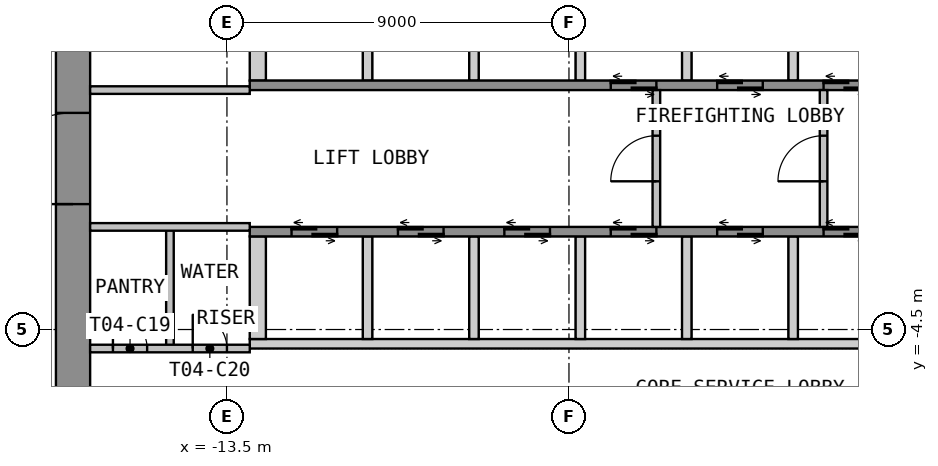
"""IFC4 building model, lengths in metres.
Left out: names, types, materials, properties, quantities, classifications, styles, units other than length and angle.
Written with IfcOpenShell. Run it as: python <this file> out.ifc"""

import sys

from ifc_helpers import new_model, si_unit, direction, frame, frame_2d, origin, place, context, subcontext, project, spatial, polyline, rectangle, outline, extrude, element, fill, save


model = new_model("IFC4")
c1 = context("Model", 3, precision=1e-05, world=origin(), true_north=direction((0.0, 1.0)))
c2 = subcontext(c1, "Body", "Model", "MODEL_VIEW")
j1 = project(units=[si_unit("LENGTHUNIT", "METRE"), si_unit("PLANEANGLEUNIT", "RADIAN")], contexts=[c1])
p1 = place(None, origin())
s1 = spatial("IfcSite", under=j1, at=p1, CompositionType="ELEMENT")
p2 = place(p1, origin())
s2 = spatial("IfcBuilding", under=s1, at=p2, CompositionType="ELEMENT")
p3 = place(p2, frame((0.0, 0.0, 65.1)))
s3 = spatial("IfcBuildingStorey", under=s2, at=p3, CompositionType="ELEMENT", Elevation=65.1)
p4 = place(p3, frame((-17.55, -12.6, 0.0), z_axis=(0.0, 0.0, 1.0), x_axis=(0.0, 1.0, 0.0)))
e1 = element("IfcWall", 1, at=p4, inside=s3, PredefinedType="SHEAR", context=c2, shape_type="SweptSolid", body=[
    extrude(rectangle(XDim=25.2, YDim=0.9, at=frame_2d((12.6, 0.0))), origin(), (0.0, 0.0, 1.0), 3.525),
])
p5 = place(p4, frame((11.4, 0.0, 0.0)))
e2 = element("IfcOpeningElement", 2, at=p5, cuts=e1, PredefinedType="OPENING", context=c2, shape_type="SweptSolid", body=[
    extrude(rectangle(XDim=2.4, YDim=2.1, at=frame_2d((1.2, 1.05))), frame((0.0, 0.46, 0.0), z_axis=(0.0, -1.0, 0.0), x_axis=(1.0, 0.0, 0.0)), (0.0, 0.0, 1.0), 0.92),
])
p6 = place(p3, origin())
e3 = element("IfcWall", 3, at=p6, inside=s3, PredefinedType="SHEAR", context=c2, shape_type="SweptSolid", body=[
    extrude(outline(polyline([(-12.9, 2.05), (-12.475, 2.05), (-12.475, 4.75), (-12.9, 4.75), (-12.9, 2.05)])), origin(), (0.0, 0.0, 1.0), 3.525),
])
p7 = place(p3, origin())
e4 = element("IfcWall", 4, at=p7, inside=s3, PredefinedType="SHEAR", context=c2, shape_type="SweptSolid", body=[
    extrude(outline(polyline([(-9.925, 2.05), (-9.675, 2.05), (-9.675, 4.75), (-9.925, 4.75), (-9.925, 2.05)])), origin(), (0.0, 0.0, 1.0), 3.525),
])
p8 = place(p3, origin())
e5 = element("IfcWall", 5, at=p8, inside=s3, PredefinedType="SHEAR", context=c2, shape_type="SweptSolid", body=[
    extrude(outline(polyline([(-7.125, 2.05), (-6.875, 2.05), (-6.875, 4.75), (-7.125, 4.75), (-7.125, 2.05)])), origin(), (0.0, 0.0, 1.0), 3.525),
])
p9 = place(p3, origin())
e6 = element("IfcWall", 6, at=p9, inside=s3, PredefinedType="SHEAR", context=c2, shape_type="SweptSolid", body=[
    extrude(outline(polyline([(-4.325, 2.05), (-4.075, 2.05), (-4.075, 4.75), (-4.325, 4.75), (-4.325, 2.05)])), origin(), (0.0, 0.0, 1.0), 3.525),
])
p10 = place(p3, origin())
e7 = element("IfcWall", 7, at=p10, inside=s3, PredefinedType="SHEAR", context=c2, shape_type="SweptSolid", body=[
    extrude(outline(polyline([(-1.525, 2.05), (-1.275, 2.05), (-1.275, 4.75), (-1.525, 4.75), (-1.525, 2.05)])), origin(), (0.0, 0.0, 1.0), 3.525),
])
p11 = place(p3, origin())
e8 = element("IfcWall", 8, at=p11, inside=s3, PredefinedType="SHEAR", context=c2, shape_type="SweptSolid", body=[
    extrude(outline(polyline([(1.275, 2.05), (1.525, 2.05), (1.525, 4.75), (1.275, 4.75), (1.275, 2.05)])), origin(), (0.0, 0.0, 1.0), 3.525),
])
p12 = place(p3, frame((-12.9, 1.925, 0.0), z_axis=(0.0, 0.0, 1.0), x_axis=(1.0, 0.0, 0.0)))
e9 = element("IfcWall", 9, at=p12, inside=s3, PredefinedType="SHEAR", context=c2, shape_type="SweptSolid", body=[
    extrude(rectangle(XDim=25.8, YDim=0.25, at=frame_2d((12.9, 0.0))), origin(), (0.0, 0.0, 1.0), 3.525),
])
p13 = place(p12, frame((9.5, 0.0, 0.0)))
e10 = element("IfcOpeningElement", 10, at=p13, cuts=e9, PredefinedType="OPENING", context=c2, shape_type="SweptSolid", body=[
    extrude(rectangle(XDim=1.2, YDim=2.1, at=frame_2d((0.6, 1.05))), frame((0.0, 0.135, 0.0), z_axis=(0.0, -1.0, 0.0), x_axis=(1.0, 0.0, 0.0)), (0.0, 0.0, 1.0), 0.27),
])
p14 = place(p12, frame((12.3, 0.0, 0.0)))
e11 = element("IfcOpeningElement", 11, at=p14, cuts=e9, PredefinedType="OPENING", context=c2, shape_type="SweptSolid", body=[
    extrude(rectangle(XDim=1.2, YDim=2.1, at=frame_2d((0.6, 1.05))), frame((0.0, 0.135, 0.0), z_axis=(0.0, -1.0, 0.0), x_axis=(1.0, 0.0, 0.0)), (0.0, 0.0, 1.0), 0.27),
])
p15 = place(p12, frame((15.1, 0.0, 0.0)))
e12 = element("IfcOpeningElement", 12, at=p15, cuts=e9, PredefinedType="OPENING", context=c2, shape_type="SweptSolid", body=[
    extrude(rectangle(XDim=1.2, YDim=2.1, at=frame_2d((0.6, 1.05))), frame((0.0, 0.135, 0.0), z_axis=(0.0, -1.0, 0.0), x_axis=(1.0, 0.0, 0.0)), (0.0, 0.0, 1.0), 0.27),
])
p16 = place(p12, frame((17.9, 0.0, 0.0)))
e13 = element("IfcOpeningElement", 13, at=p16, cuts=e9, PredefinedType="OPENING", context=c2, shape_type="SweptSolid", body=[
    extrude(rectangle(XDim=1.2, YDim=2.1, at=frame_2d((0.6, 1.05))), frame((0.0, 0.135, 0.0), z_axis=(0.0, -1.0, 0.0), x_axis=(1.0, 0.0, 0.0)), (0.0, 0.0, 1.0), 0.27),
])
p17 = place(p12, frame((20.7, 0.0, 0.0)))
e14 = element("IfcOpeningElement", 14, at=p17, cuts=e9, PredefinedType="OPENING", context=c2, shape_type="SweptSolid", body=[
    extrude(rectangle(XDim=1.2, YDim=2.1, at=frame_2d((0.6, 1.05))), frame((0.0, 0.135, 0.0), z_axis=(0.0, -1.0, 0.0), x_axis=(1.0, 0.0, 0.0)), (0.0, 0.0, 1.0), 0.27),
])
p18 = place(p12, frame((23.5, 0.0, 0.0)))
e15 = element("IfcOpeningElement", 15, at=p18, cuts=e9, PredefinedType="OPENING", context=c2, shape_type="SweptSolid", body=[
    extrude(rectangle(XDim=1.2, YDim=2.1, at=frame_2d((0.6, 1.05))), frame((0.0, 0.135, 0.0), z_axis=(0.0, -1.0, 0.0), x_axis=(1.0, 0.0, 0.0)), (0.0, 0.0, 1.0), 0.27),
])
p19 = place(p3, origin())
e16 = element("IfcWall", 16, at=p19, inside=s3, PredefinedType="SHEAR", context=c2, shape_type="SweptSolid", body=[
    extrude(outline(polyline([(-12.9, -5.0), (12.9, -5.0), (12.9, -4.75), (-12.9, -4.75), (-12.9, -5.0)])), origin(), (0.0, 0.0, 1.0), 3.525),
])
p20 = place(p3, origin())
e17 = element("IfcWall", 17, at=p20, inside=s3, PredefinedType="SHEAR", context=c2, shape_type="SweptSolid", body=[
    extrude(outline(polyline([(-12.9, -4.75), (-12.475, -4.75), (-12.475, -2.05), (-12.9, -2.05), (-12.9, -4.75)])), origin(), (0.0, 0.0, 1.0), 3.525),
])
p21 = place(p3, origin())
e18 = element("IfcWall", 18, at=p21, inside=s3, PredefinedType="SHEAR", context=c2, shape_type="SweptSolid", body=[
    extrude(outline(polyline([(-9.925, -4.75), (-9.675, -4.75), (-9.675, -2.05), (-9.925, -2.05), (-9.925, -4.75)])), origin(), (0.0, 0.0, 1.0), 3.525),
])
p22 = place(p3, origin())
e19 = element("IfcWall", 19, at=p22, inside=s3, PredefinedType="SHEAR", context=c2, shape_type="SweptSolid", body=[
    extrude(outline(polyline([(-7.125, -4.75), (-6.875, -4.75), (-6.875, -2.05), (-7.125, -2.05), (-7.125, -4.75)])), origin(), (0.0, 0.0, 1.0), 3.525),
])
p23 = place(p3, origin())
e20 = element("IfcWall", 20, at=p23, inside=s3, PredefinedType="SHEAR", context=c2, shape_type="SweptSolid", body=[
    extrude(outline(polyline([(-4.325, -4.75), (-4.075, -4.75), (-4.075, -2.05), (-4.325, -2.05), (-4.325, -4.75)])), origin(), (0.0, 0.0, 1.0), 3.525),
])
p24 = place(p3, origin())
e21 = element("IfcWall", 21, at=p24, inside=s3, PredefinedType="SHEAR", context=c2, shape_type="SweptSolid", body=[
    extrude(outline(polyline([(-1.525, -4.75), (-1.275, -4.75), (-1.275, -2.05), (-1.525, -2.05), (-1.525, -4.75)])), origin(), (0.0, 0.0, 1.0), 3.525),
])
p25 = place(p3, origin())
e22 = element("IfcWall", 22, at=p25, inside=s3, PredefinedType="SHEAR", context=c2, shape_type="SweptSolid", body=[
    extrude(outline(polyline([(1.275, -4.75), (1.525, -4.75), (1.525, -2.05), (1.275, -2.05), (1.275, -4.75)])), origin(), (0.0, 0.0, 1.0), 3.525),
])
p26 = place(p3, frame((-12.9, -1.925, 0.0), z_axis=(0.0, 0.0, 1.0), x_axis=(1.0, 0.0, 0.0)))
e23 = element("IfcWall", 23, at=p26, inside=s3, PredefinedType="SHEAR", context=c2, shape_type="SweptSolid", body=[
    extrude(rectangle(XDim=25.8, YDim=0.25, at=frame_2d((12.9, 0.0))), origin(), (0.0, 0.0, 1.0), 3.525),
])
p27 = place(p26, frame((1.1, 0.0, 0.0)))
e24 = element("IfcOpeningElement", 24, at=p27, cuts=e23, PredefinedType="OPENING", context=c2, shape_type="SweptSolid", body=[
    extrude(rectangle(XDim=1.2, YDim=2.1, at=frame_2d((0.6, 1.05))), frame((0.0, 0.135, 0.0), z_axis=(0.0, -1.0, 0.0), x_axis=(1.0, 0.0, 0.0)), (0.0, 0.0, 1.0), 0.27),
])
p28 = place(p26, frame((3.9, 0.0, 0.0)))
e25 = element("IfcOpeningElement", 25, at=p28, cuts=e23, PredefinedType="OPENING", context=c2, shape_type="SweptSolid", body=[
    extrude(rectangle(XDim=1.2, YDim=2.1, at=frame_2d((0.6, 1.05))), frame((0.0, 0.135, 0.0), z_axis=(0.0, -1.0, 0.0), x_axis=(1.0, 0.0, 0.0)), (0.0, 0.0, 1.0), 0.27),
])
p29 = place(p26, frame((6.7, 0.0, 0.0)))
e26 = element("IfcOpeningElement", 26, at=p29, cuts=e23, PredefinedType="OPENING", context=c2, shape_type="SweptSolid", body=[
    extrude(rectangle(XDim=1.2, YDim=2.1, at=frame_2d((0.6, 1.05))), frame((0.0, 0.135, 0.0), z_axis=(0.0, -1.0, 0.0), x_axis=(1.0, 0.0, 0.0)), (0.0, 0.0, 1.0), 0.27),
])
p30 = place(p26, frame((9.5, 0.0, 0.0)))
e27 = element("IfcOpeningElement", 27, at=p30, cuts=e23, PredefinedType="OPENING", context=c2, shape_type="SweptSolid", body=[
    extrude(rectangle(XDim=1.2, YDim=2.1, at=frame_2d((0.6, 1.05))), frame((0.0, 0.135, 0.0), z_axis=(0.0, -1.0, 0.0), x_axis=(1.0, 0.0, 0.0)), (0.0, 0.0, 1.0), 0.27),
])
p31 = place(p26, frame((12.3, 0.0, 0.0)))
e28 = element("IfcOpeningElement", 28, at=p31, cuts=e23, PredefinedType="OPENING", context=c2, shape_type="SweptSolid", body=[
    extrude(rectangle(XDim=1.2, YDim=2.1, at=frame_2d((0.6, 1.05))), frame((0.0, 0.135, 0.0), z_axis=(0.0, -1.0, 0.0), x_axis=(1.0, 0.0, 0.0)), (0.0, 0.0, 1.0), 0.27),
])
p32 = place(p26, frame((15.1, 0.0, 0.0)))
e29 = element("IfcOpeningElement", 29, at=p32, cuts=e23, PredefinedType="OPENING", context=c2, shape_type="SweptSolid", body=[
    extrude(rectangle(XDim=1.2, YDim=2.1, at=frame_2d((0.6, 1.05))), frame((0.0, 0.135, 0.0), z_axis=(0.0, -1.0, 0.0), x_axis=(1.0, 0.0, 0.0)), (0.0, 0.0, 1.0), 0.27),
])
p33 = place(p3, frame((-2.2, -1.8, 0.0), z_axis=(0.0, 0.0, 1.0), x_axis=(0.0, 1.0, 0.0)))
e30 = element("IfcWall", 30, at=p33, inside=s3, PredefinedType="PARTITIONING", context=c2, shape_type="SweptSolid", body=[
    extrude(rectangle(XDim=3.6, YDim=0.2, at=frame_2d((1.8, 0.0))), origin(), (0.0, 0.0, 1.0), 3.525),
])
p34 = place(p33, frame((1.2, 0.0, 0.0)))
e31 = element("IfcOpeningElement", 31, at=p34, cuts=e30, PredefinedType="OPENING", context=c2, shape_type="SweptSolid", body=[
    extrude(rectangle(XDim=1.2, YDim=2.1, at=frame_2d((0.6, 1.05))), frame((0.0, 0.11, 0.0), z_axis=(0.0, -1.0, 0.0), x_axis=(1.0, 0.0, 0.0)), (0.0, 0.0, 1.0), 0.22),
])
p35 = place(p3, frame((2.2, -1.8, 0.0), z_axis=(0.0, 0.0, 1.0), x_axis=(0.0, 1.0, 0.0)))
e32 = element("IfcWall", 32, at=p35, inside=s3, PredefinedType="PARTITIONING", context=c2, shape_type="SweptSolid", body=[
    extrude(rectangle(XDim=3.6, YDim=0.2, at=frame_2d((1.8, 0.0))), origin(), (0.0, 0.0, 1.0), 3.525),
])
p36 = place(p35, frame((1.2, 0.0, 0.0)))
e33 = element("IfcOpeningElement", 33, at=p36, cuts=e32, PredefinedType="OPENING", context=c2, shape_type="SweptSolid", body=[
    extrude(rectangle(XDim=1.2, YDim=2.1, at=frame_2d((0.6, 1.05))), frame((0.0, 0.11, 0.0), z_axis=(0.0, -1.0, 0.0), x_axis=(1.0, 0.0, 0.0)), (0.0, 0.0, 1.0), 0.22),
])
p37 = place(p3, frame((-17.1, 1.8, 0.0), z_axis=(0.0, 0.0, 1.0), x_axis=(1.0, 0.0, 0.0)))
e34 = element("IfcWall", 34, at=p37, inside=s3, PredefinedType="PARTITIONING", context=c2, shape_type="SweptSolid", body=[
    extrude(rectangle(XDim=4.2, YDim=0.2, at=frame_2d((2.1, 0.0))), origin(), (0.0, 0.0, 1.0), 3.525),
])
p38 = place(p3, frame((-15.0, -5.0, 0.0), z_axis=(0.0, 0.0, 1.0), x_axis=(0.0, 1.0, 0.0)))
e35 = element("IfcWall", 35, at=p38, inside=s3, PredefinedType="PARTITIONING", context=c2, shape_type="SweptSolid", body=[
    extrude(rectangle(XDim=3.2, YDim=0.2, at=frame_2d((1.6, 0.0))), origin(), (0.0, 0.0, 1.0), 3.525),
])
p39 = place(p3, frame((-17.1, -5.0, 0.0), z_axis=(0.0, 0.0, 1.0), x_axis=(1.0, 0.0, 0.0)))
e36 = element("IfcWall", 36, at=p39, inside=s3, PredefinedType="PARTITIONING", context=c2, shape_type="SweptSolid", body=[
    extrude(rectangle(XDim=4.2, YDim=0.2, at=frame_2d((2.1, 0.0))), origin(), (0.0, 0.0, 1.0), 3.525),
])
p40 = place(p39, frame((0.6, 0.0, 0.0)))
e37 = element("IfcOpeningElement", 37, at=p40, cuts=e36, PredefinedType="OPENING", context=c2, shape_type="SweptSolid", body=[
    extrude(rectangle(XDim=0.9, YDim=2.1, at=frame_2d((0.45, 1.05))), frame((0.0, 0.11, 0.0), z_axis=(0.0, -1.0, 0.0), x_axis=(1.0, 0.0, 0.0)), (0.0, 0.0, 1.0), 0.22),
])
p41 = place(p39, frame((2.7, 0.0, 0.0)))
e38 = element("IfcOpeningElement", 38, at=p41, cuts=e36, PredefinedType="OPENING", context=c2, shape_type="SweptSolid", body=[
    extrude(rectangle(XDim=0.9, YDim=2.1, at=frame_2d((0.45, 1.05))), frame((0.0, 0.11, 0.0), z_axis=(0.0, -1.0, 0.0), x_axis=(1.0, 0.0, 0.0)), (0.0, 0.0, 1.0), 0.22),
])
p42 = place(p3, frame((-17.1, -1.8, 0.0), z_axis=(0.0, 0.0, 1.0), x_axis=(1.0, 0.0, 0.0)))
e39 = element("IfcWall", 39, at=p42, inside=s3, PredefinedType="PARTITIONING", context=c2, shape_type="SweptSolid", body=[
    extrude(rectangle(XDim=4.2, YDim=0.2, at=frame_2d((2.1, 0.0))), origin(), (0.0, 0.0, 1.0), 3.525),
])
p43 = place(p5, origin())
e40 = element("IfcDoor", 40, at=p43, inside=s3, OperationType="DOUBLE_DOOR_DOUBLE_SWING", PredefinedType="DOOR", context=c2, shape_type="SweptSolid", body=[
    extrude(rectangle(XDim=2.4, YDim=2.1, at=frame_2d((1.2, 1.05))), frame((0.0, 0.025, 0.0), z_axis=(0.0, -1.0, 0.0), x_axis=(1.0, 0.0, 0.0)), (0.0, 0.0, 1.0), 0.05),
])
fill(e2, e40)
p44 = place(p13, origin())
e41 = element("IfcDoor", 41, at=p44, inside=s3, OperationType="DOUBLE_DOOR_SLIDING", PredefinedType="DOOR", context=c2, shape_type="SweptSolid", body=[
    extrude(rectangle(XDim=1.2, YDim=2.1, at=frame_2d((0.6, 1.05))), frame((0.0, 0.025, 0.0), z_axis=(0.0, -1.0, 0.0), x_axis=(1.0, 0.0, 0.0)), (0.0, 0.0, 1.0), 0.05),
])
fill(e10, e41)
p45 = place(p14, origin())
e42 = element("IfcDoor", 42, at=p45, inside=s3, OperationType="DOUBLE_DOOR_SLIDING", PredefinedType="DOOR", context=c2, shape_type="SweptSolid", body=[
    extrude(rectangle(XDim=1.2, YDim=2.1, at=frame_2d((0.6, 1.05))), frame((0.0, 0.025, 0.0), z_axis=(0.0, -1.0, 0.0), x_axis=(1.0, 0.0, 0.0)), (0.0, 0.0, 1.0), 0.05),
])
fill(e11, e42)
p46 = place(p15, origin())
e43 = element("IfcDoor", 43, at=p46, inside=s3, OperationType="DOUBLE_DOOR_SLIDING", PredefinedType="DOOR", context=c2, shape_type="SweptSolid", body=[
    extrude(rectangle(XDim=1.2, YDim=2.1, at=frame_2d((0.6, 1.05))), frame((0.0, 0.025, 0.0), z_axis=(0.0, -1.0, 0.0), x_axis=(1.0, 0.0, 0.0)), (0.0, 0.0, 1.0), 0.05),
])
fill(e12, e43)
p47 = place(p27, origin())
e44 = element("IfcDoor", 44, at=p47, inside=s3, OperationType="DOUBLE_DOOR_SLIDING", PredefinedType="DOOR", context=c2, shape_type="SweptSolid", body=[
    extrude(rectangle(XDim=1.2, YDim=2.1, at=frame_2d((0.6, 1.05))), frame((0.0, 0.025, 0.0), z_axis=(0.0, -1.0, 0.0), x_axis=(1.0, 0.0, 0.0)), (0.0, 0.0, 1.0), 0.05),
])
fill(e24, e44)
p48 = place(p28, origin())
e45 = element("IfcDoor", 45, at=p48, inside=s3, OperationType="DOUBLE_DOOR_SLIDING", PredefinedType="DOOR", context=c2, shape_type="SweptSolid", body=[
    extrude(rectangle(XDim=1.2, YDim=2.1, at=frame_2d((0.6, 1.05))), frame((0.0, 0.025, 0.0), z_axis=(0.0, -1.0, 0.0), x_axis=(1.0, 0.0, 0.0)), (0.0, 0.0, 1.0), 0.05),
])
fill(e25, e45)
p49 = place(p29, origin())
e46 = element("IfcDoor", 46, at=p49, inside=s3, OperationType="DOUBLE_DOOR_SLIDING", PredefinedType="DOOR", context=c2, shape_type="SweptSolid", body=[
    extrude(rectangle(XDim=1.2, YDim=2.1, at=frame_2d((0.6, 1.05))), frame((0.0, 0.025, 0.0), z_axis=(0.0, -1.0, 0.0), x_axis=(1.0, 0.0, 0.0)), (0.0, 0.0, 1.0), 0.05),
])
fill(e26, e46)
p50 = place(p30, origin())
e47 = element("IfcDoor", 47, at=p50, inside=s3, OperationType="DOUBLE_DOOR_SLIDING", PredefinedType="DOOR", context=c2, shape_type="SweptSolid", body=[
    extrude(rectangle(XDim=1.2, YDim=2.1, at=frame_2d((0.6, 1.05))), frame((0.0, 0.025, 0.0), z_axis=(0.0, -1.0, 0.0), x_axis=(1.0, 0.0, 0.0)), (0.0, 0.0, 1.0), 0.05),
])
fill(e27, e47)
p51 = place(p31, origin())
e48 = element("IfcDoor", 48, at=p51, inside=s3, OperationType="DOUBLE_DOOR_SLIDING", PredefinedType="DOOR", context=c2, shape_type="SweptSolid", body=[
    extrude(rectangle(XDim=1.2, YDim=2.1, at=frame_2d((0.6, 1.05))), frame((0.0, 0.025, 0.0), z_axis=(0.0, -1.0, 0.0), x_axis=(1.0, 0.0, 0.0)), (0.0, 0.0, 1.0), 0.05),
])
fill(e28, e48)
p52 = place(p32, origin())
e49 = element("IfcDoor", 49, at=p52, inside=s3, OperationType="DOUBLE_DOOR_SLIDING", PredefinedType="DOOR", context=c2, shape_type="SweptSolid", body=[
    extrude(rectangle(XDim=1.2, YDim=2.1, at=frame_2d((0.6, 1.05))), frame((0.0, 0.025, 0.0), z_axis=(0.0, -1.0, 0.0), x_axis=(1.0, 0.0, 0.0)), (0.0, 0.0, 1.0), 0.05),
])
fill(e29, e49)
p53 = place(p34, origin())
e50 = element("IfcDoor", 50, at=p53, inside=s3, OperationType="SINGLE_SWING_LEFT", PredefinedType="DOOR", context=c2, shape_type="SweptSolid", body=[
    extrude(rectangle(XDim=1.2, YDim=2.1, at=frame_2d((0.6, 1.05))), frame((0.0, 0.025, 0.0), z_axis=(0.0, -1.0, 0.0), x_axis=(1.0, 0.0, 0.0)), (0.0, 0.0, 1.0), 0.05),
])
fill(e31, e50)
p54 = place(p36, origin())
e51 = element("IfcDoor", 51, at=p54, inside=s3, OperationType="SINGLE_SWING_LEFT", PredefinedType="DOOR", context=c2, shape_type="SweptSolid", body=[
    extrude(rectangle(XDim=1.2, YDim=2.1, at=frame_2d((0.6, 1.05))), frame((0.0, 0.025, 0.0), z_axis=(0.0, -1.0, 0.0), x_axis=(1.0, 0.0, 0.0)), (0.0, 0.0, 1.0), 0.05),
])
fill(e33, e51)
p55 = place(p40, origin())
e52 = element("IfcDoor", 52, at=p55, inside=s3, OperationType="SINGLE_SWING_LEFT", PredefinedType="DOOR", context=c2, shape_type="SweptSolid", body=[
    extrude(rectangle(XDim=0.9, YDim=2.1, at=frame_2d((0.45, 1.05))), frame((0.0, 0.025, 0.0), z_axis=(0.0, -1.0, 0.0), x_axis=(1.0, 0.0, 0.0)), (0.0, 0.0, 1.0), 0.05),
])
fill(e37, e52)
p56 = place(p41, origin())
e53 = element("IfcDoor", 53, at=p56, inside=s3, OperationType="SINGLE_SWING_LEFT", PredefinedType="DOOR", context=c2, shape_type="SweptSolid", body=[
    extrude(rectangle(XDim=0.9, YDim=2.1, at=frame_2d((0.45, 1.05))), frame((0.0, 0.025, 0.0), z_axis=(0.0, -1.0, 0.0), x_axis=(1.0, 0.0, 0.0)), (0.0, 0.0, 1.0), 0.05),
])
fill(e38, e53)
save(model, sys.argv[1])
